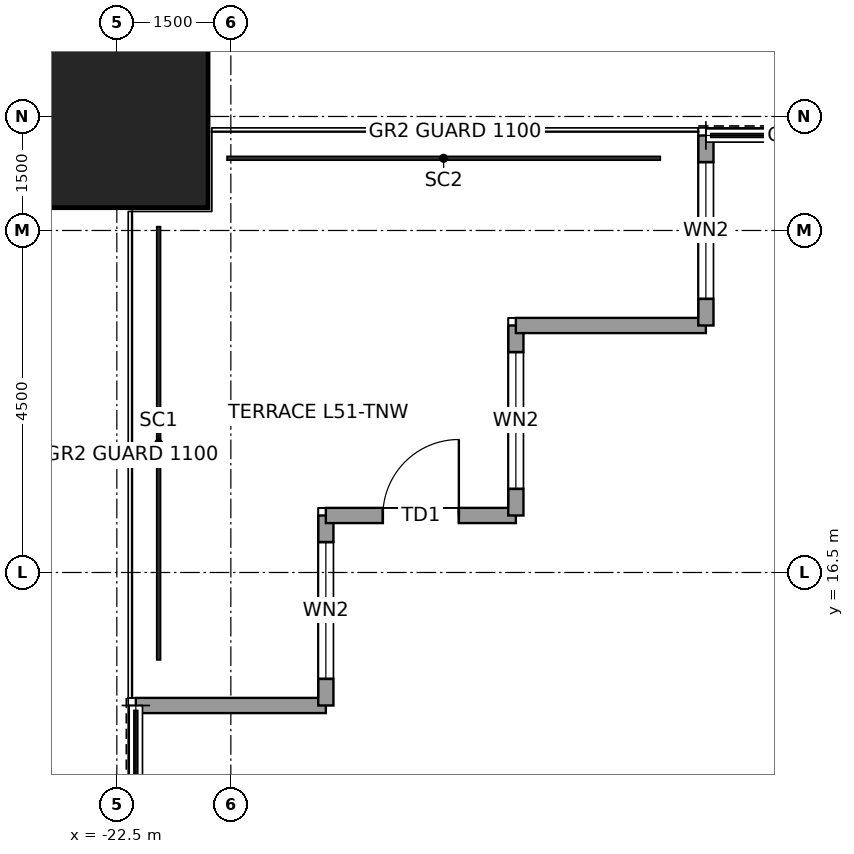
"""IFC4 building model, lengths in metres.
Left out: names, types, materials, properties, quantities, classifications, styles, units other than length and angle.
Written with IfcOpenShell. Run it as: python <this file> out.ifc"""

import sys

from ifc_helpers import new_model, si_unit, direction, frame, frame_2d, origin, origin_2d, place, context, subcontext, project, spatial, rectangle, hollow_rectangle, extrude, element, fill, save


model = new_model("IFC4")
c1 = context("Model", 3, precision=1e-05, world=origin(), true_north=direction((0.0, 1.0)))
c2 = subcontext(c1, "Body", "Model", "MODEL_VIEW")
j1 = project(units=[si_unit("LENGTHUNIT", "METRE"), si_unit("PLANEANGLEUNIT", "RADIAN")], contexts=[c1])
p1 = place(None, origin())
s1 = spatial("IfcSite", under=j1, at=p1, CompositionType="ELEMENT")
p2 = place(p1, origin())
s2 = spatial("IfcBuilding", under=s1, at=p2, CompositionType="ELEMENT")
p3 = place(p2, frame((0.0, 0.0, 237.9)))
s3 = spatial("IfcBuildingStorey", under=s2, at=p3, CompositionType="ELEMENT", Elevation=237.9)
p4 = place(p3, frame((-22.5, 22.5, 0.0), z_axis=(0.0, 0.0, 1.0), x_axis=(1.0, 0.0, 0.0)))
e1 = element("IfcColumn", 1, at=p4, inside=s3, PredefinedType="COLUMN", context=c2, shape_type="SweptSolid", body=[
    extrude(hollow_rectangle(XDim=2.4, YDim=2.4, WallThickness=0.12, at=origin_2d()), origin(), (0.0, 0.0, 1.0), 4.0),
])
p5 = place(p3, frame((-22.25, 14.75, 0.0), z_axis=(0.0, 0.0, 1.0), x_axis=(1.0, 0.0, 0.0)))
e2 = element("IfcWall", 2, at=p5, inside=s3, PredefinedType="SOLIDWALL", context=c2, shape_type="SweptSolid", body=[
    extrude(rectangle(XDim=2.5, YDim=0.2, at=frame_2d((1.25, 0.0))), origin(), (0.0, 0.0, 1.0), 3.85),
])
p6 = place(p3, frame((-19.75, 14.75, 0.0), z_axis=(0.0, 0.0, 1.0), x_axis=(0.0, 1.0, 0.0)))
e3 = element("IfcWall", 3, at=p6, inside=s3, PredefinedType="SOLIDWALL", context=c2, shape_type="SweptSolid", body=[
    extrude(rectangle(XDim=2.5, YDim=0.2, at=frame_2d((1.25, 0.0))), origin(), (0.0, 0.0, 1.0), 3.85),
])
p7 = place(p6, frame((0.35, 0.0, 0.3)))
e4 = element("IfcOpeningElement", 4, at=p7, cuts=e3, PredefinedType="OPENING", context=c2, shape_type="SweptSolid", body=[
    extrude(rectangle(XDim=1.8, YDim=2.4, at=frame_2d((0.9, 1.2))), frame((0.0, 0.11, 0.0), z_axis=(0.0, -1.0, 0.0), x_axis=(1.0, 0.0, 0.0)), (0.0, 0.0, 1.0), 0.22),
])
p8 = place(p3, frame((-19.75, 17.25, 0.0), z_axis=(0.0, 0.0, 1.0), x_axis=(1.0, 0.0, 0.0)))
e5 = element("IfcWall", 5, at=p8, inside=s3, PredefinedType="SOLIDWALL", context=c2, shape_type="SweptSolid", body=[
    extrude(rectangle(XDim=2.5, YDim=0.2, at=frame_2d((1.25, 0.0))), origin(), (0.0, 0.0, 1.0), 3.85),
])
p9 = place(p8, frame((0.75, 0.0, 0.0)))
e6 = element("IfcOpeningElement", 6, at=p9, cuts=e5, PredefinedType="OPENING", context=c2, shape_type="SweptSolid", body=[
    extrude(rectangle(XDim=1.0, YDim=2.4, at=frame_2d((0.5, 1.2))), frame((0.0, 0.11, 0.0), z_axis=(0.0, -1.0, 0.0), x_axis=(1.0, 0.0, 0.0)), (0.0, 0.0, 1.0), 0.22),
])
p10 = place(p3, frame((-17.25, 17.25, 0.0), z_axis=(0.0, 0.0, 1.0), x_axis=(0.0, 1.0, 0.0)))
e7 = element("IfcWall", 7, at=p10, inside=s3, PredefinedType="SOLIDWALL", context=c2, shape_type="SweptSolid", body=[
    extrude(rectangle(XDim=2.5, YDim=0.2, at=frame_2d((1.25, 0.0))), origin(), (0.0, 0.0, 1.0), 3.85),
])
p11 = place(p10, frame((0.35, 0.0, 0.3)))
e8 = element("IfcOpeningElement", 8, at=p11, cuts=e7, PredefinedType="OPENING", context=c2, shape_type="SweptSolid", body=[
    extrude(rectangle(XDim=1.8, YDim=2.4, at=frame_2d((0.9, 1.2))), frame((0.0, 0.11, 0.0), z_axis=(0.0, -1.0, 0.0), x_axis=(1.0, 0.0, 0.0)), (0.0, 0.0, 1.0), 0.22),
])
p12 = place(p3, frame((-17.25, 19.75, 0.0), z_axis=(0.0, 0.0, 1.0), x_axis=(1.0, 0.0, 0.0)))
e9 = element("IfcWall", 9, at=p12, inside=s3, PredefinedType="SOLIDWALL", context=c2, shape_type="SweptSolid", body=[
    extrude(rectangle(XDim=2.5, YDim=0.2, at=frame_2d((1.25, 0.0))), origin(), (0.0, 0.0, 1.0), 3.85),
])
p13 = place(p3, frame((-14.75, 19.75, 0.0), z_axis=(0.0, 0.0, 1.0), x_axis=(0.0, 1.0, 0.0)))
e10 = element("IfcWall", 10, at=p13, inside=s3, PredefinedType="SOLIDWALL", context=c2, shape_type="SweptSolid", body=[
    extrude(rectangle(XDim=2.5, YDim=0.2, at=frame_2d((1.25, 0.0))), origin(), (0.0, 0.0, 1.0), 3.85),
])
p14 = place(p13, frame((0.35, 0.0, 0.3)))
e11 = element("IfcOpeningElement", 11, at=p14, cuts=e10, PredefinedType="OPENING", context=c2, shape_type="SweptSolid", body=[
    extrude(rectangle(XDim=1.8, YDim=2.4, at=frame_2d((0.9, 1.2))), frame((0.0, 0.11, 0.0), z_axis=(0.0, -1.0, 0.0), x_axis=(1.0, 0.0, 0.0)), (0.0, 0.0, 1.0), 0.22),
])
p15 = place(p7, origin())
e12 = element("IfcWindow", 12, at=p15, inside=s3, PartitioningType="SINGLE_PANEL", PredefinedType="WINDOW", context=c2, shape_type="SweptSolid", body=[
    extrude(rectangle(XDim=1.8, YDim=2.4, at=frame_2d((0.9, 1.2))), frame((0.0, 0.03, 0.0), z_axis=(0.0, -1.0, 0.0), x_axis=(1.0, 0.0, 0.0)), (0.0, 0.0, 1.0), 0.06),
])
fill(e4, e12)
p16 = place(p9, origin())
e13 = element("IfcDoor", 13, at=p16, inside=s3, OperationType="SINGLE_SWING_RIGHT", PredefinedType="DOOR", context=c2, shape_type="SweptSolid", body=[
    extrude(rectangle(XDim=1.0, YDim=2.4, at=frame_2d((0.5, 1.2))), frame((0.0, 0.025, 0.0), z_axis=(0.0, -1.0, 0.0), x_axis=(1.0, 0.0, 0.0)), (0.0, 0.0, 1.0), 0.05),
])
fill(e6, e13)
p17 = place(p11, origin())
e14 = element("IfcWindow", 14, at=p17, inside=s3, PartitioningType="SINGLE_PANEL", PredefinedType="WINDOW", context=c2, shape_type="SweptSolid", body=[
    extrude(rectangle(XDim=1.8, YDim=2.4, at=frame_2d((0.9, 1.2))), frame((0.0, 0.03, 0.0), z_axis=(0.0, -1.0, 0.0), x_axis=(1.0, 0.0, 0.0)), (0.0, 0.0, 1.0), 0.06),
])
fill(e8, e14)
p18 = place(p14, origin())
e15 = element("IfcWindow", 15, at=p18, inside=s3, PartitioningType="SINGLE_PANEL", PredefinedType="WINDOW", context=c2, shape_type="SweptSolid", body=[
    extrude(rectangle(XDim=1.8, YDim=2.4, at=frame_2d((0.9, 1.2))), frame((0.0, 0.03, 0.0), z_axis=(0.0, -1.0, 0.0), x_axis=(1.0, 0.0, 0.0)), (0.0, 0.0, 1.0), 0.06),
])
fill(e11, e15)
save(model, sys.argv[1])
